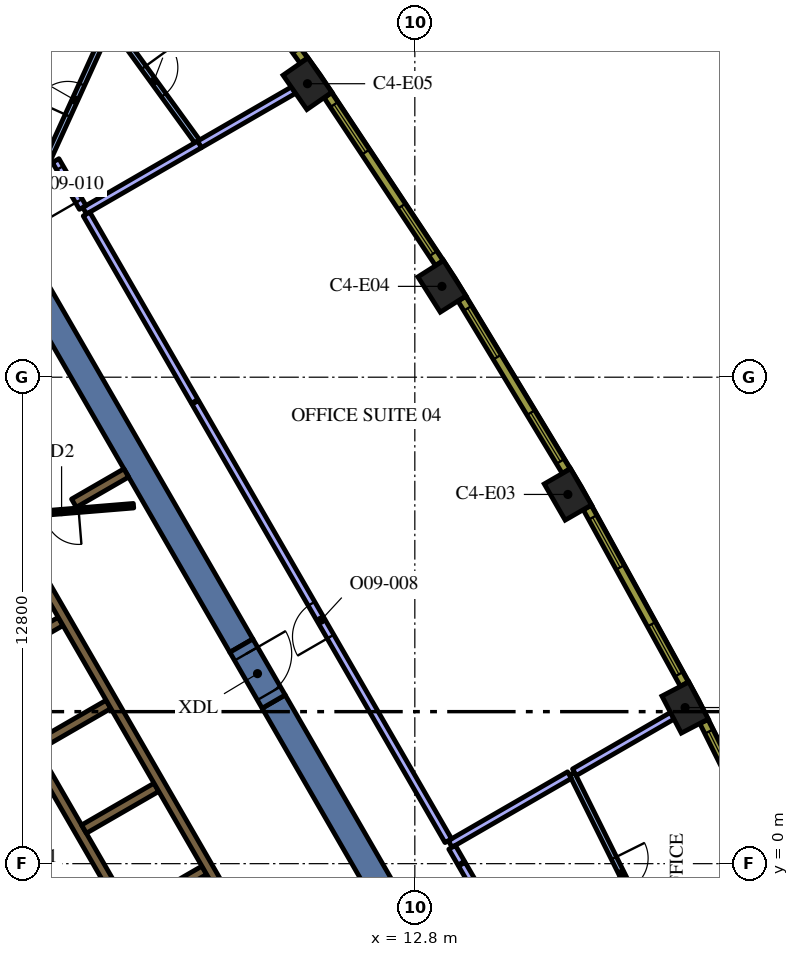
"""IFC4 building model, lengths in metres.
Left out: names, types, materials, properties, quantities, classifications, styles, units other than length and angle.
Written with IfcOpenShell. Run it as: python <this file> out.ifc"""

import sys

from ifc_helpers import new_model, si_unit, direction, frame, frame_2d, origin, origin_2d, place, context, subcontext, project, spatial, rectangle, extrude, element, fill, save


model = new_model("IFC4")
c1 = context("Model", 3, precision=1e-05, world=origin(), true_north=direction((0.0, 1.0)))
c2 = subcontext(c1, "Body", "Model", "MODEL_VIEW")
j1 = project(units=[si_unit("LENGTHUNIT", "METRE"), si_unit("PLANEANGLEUNIT", "RADIAN")], contexts=[c1])
p1 = place(None, origin())
s1 = spatial("IfcSite", under=j1, at=p1, CompositionType="ELEMENT")
p2 = place(p1, origin())
s2 = spatial("IfcBuilding", under=s1, at=p2, CompositionType="ELEMENT")
p3 = place(p2, frame((0.0, 0.0, 247.8)))
s3 = spatial("IfcBuildingStorey", under=s2, at=p3, CompositionType="ELEMENT", Elevation=247.8)
for number, where, z_axis, x_axis in (
    (1, (19.912, 4.108, 0.0), (0.0, 0.0, 1.0), (-0.464, 0.886, 0.0)),
    (2, (16.827, 9.715, 0.0), (0.0, 0.0, 1.0), (-0.5, 0.866, 0.0)),
    (3, (13.513, 15.19, 0.0), (0.0, 0.0, 1.0), (-0.536, 0.845, 0.0)),
    (4, (9.975, 20.522, 0.0), (0.0, 0.0, 1.0), (-0.57, 0.822, 0.0)),
):
    element("IfcColumn", number, at=place(p3, frame(where, z_axis=z_axis, x_axis=x_axis)), inside=s3, PredefinedType="COLUMN", context=c2, shape_type="SweptSolid", body=[
        extrude(rectangle(XDim=1.1, YDim=0.8, at=origin_2d()), origin(), (0.0, 0.0, 1.0), 4.2),
    ])
for number, where, z_axis, x_axis in (
    (5, (9.085, 4.264, 0.0), (0.0, 0.0, 1.0), (0.5, -0.866, 0.0)),
    (6, (8.235, 5.736, 0.0), (0.0, 0.0, 1.0), (-0.5, 0.866, 0.0)),
):
    element("IfcWall", number, at=place(p3, frame(where, z_axis=z_axis, x_axis=x_axis)), inside=s3, PredefinedType="SOLIDWALL", context=c2, shape_type="SweptSolid", body=[
        extrude(rectangle(XDim=12.472, YDim=0.7, at=frame_2d((6.236, 0.0))), origin(), (0.0, 0.0, 1.0), 4.2),
    ])
p4 = place(p3, frame((6.568, -3.627, 0.0), z_axis=(0.0, 0.0, 1.0), x_axis=(-0.499999455981, 0.866025717874, 0.0)))
e7 = element("IfcWall", 7, at=p4, inside=s3, PredefinedType="SOLIDWALL", context=c2, shape_type="SweptSolid", body=[
    extrude(rectangle(XDim=11.978, YDim=0.25, at=frame_2d((5.989, 0.0))), origin(), (0.0, 0.0, 1.0), 4.2),
])
p5 = place(p3, frame((1.574, 5.274, 0.0), z_axis=(0.0, 0.0, 1.0), x_axis=(0.866028486751, 0.499994660107, 0.0)))
e8 = element("IfcWall", 8, at=p5, inside=s3, PredefinedType="SOLIDWALL", context=c2, shape_type="SweptSolid", body=[
    extrude(rectangle(XDim=2.2, YDim=0.25, at=frame_2d((1.1, 0.0))), origin(), (0.0, 0.0, 1.0), 4.2),
])
for number, where, z_axis, x_axis in (
    (9, (2.834, 3.091, 0.0), (0.0, 0.0, 1.0), (0.866, 0.5, 0.0)),
    (10, (4.094, 0.909, 0.0), (0.0, 0.0, 1.0), (0.866, 0.5, 0.0)),
    (11, (5.354, -1.274, 0.0), (0.0, 0.0, 1.0), (0.866, 0.5, 0.0)),
):
    element("IfcWall", number, at=place(p3, frame(where, z_axis=z_axis, x_axis=x_axis)), inside=s3, PredefinedType="SOLIDWALL", context=c2, shape_type="SweptSolid", body=[
        extrude(rectangle(XDim=2.2, YDim=0.25, at=frame_2d((1.1, 0.0))), origin(), (0.0, 0.0, 1.0), 4.2),
    ])
p6 = place(p3, frame((3.83, 9.486, 0.0), z_axis=(0.0, 0.0, 1.0), x_axis=(0.865986202621, 0.500067892261, 0.0)))
e12 = element("IfcWall", 12, at=p6, inside=s3, PredefinedType="SOLIDWALL", context=c2, shape_type="SweptSolid", body=[
    extrude(rectangle(XDim=1.591, YDim=0.25, at=frame_2d((0.795, 0.0))), origin(), (0.0, 0.0, 1.0), 4.2),
])
p7 = place(p3, frame((8.565, -2.185, 0.0), z_axis=(0.0, 0.0, 1.0), x_axis=(-0.499997954832, 0.866026584559, 0.0)))
e13 = element("IfcWall", 13, at=p7, inside=s3, PredefinedType="SOLIDWALL", context=c2, shape_type="SweptSolid", body=[
    extrude(rectangle(XDim=12.35, YDim=0.25, at=frame_2d((6.175, 0.0))), origin(), (0.0, 0.0, 1.0), 4.2),
])
p8 = place(p7, frame((0.585, 0.0, 0.0)))
e14 = element("IfcOpeningElement", 14, at=p8, cuts=e13, PredefinedType="OPENING", context=c2, shape_type="SweptSolid", body=[
    extrude(rectangle(XDim=1.1, YDim=2.1, at=frame_2d((0.55, 1.05))), frame((0.0, 0.135, 0.0), z_axis=(0.0, -1.0, 0.0), x_axis=(1.0, 0.0, 0.0)), (0.0, 0.0, 1.0), 0.27),
])
p9 = place(p3, frame((5.398, 9.419, 0.0), z_axis=(0.0, 0.0, 1.0), x_axis=(-0.996653416376, -0.081743303248, 0.0)))
e15 = element("IfcWall", 15, at=p9, inside=s3, PredefinedType="PARTITIONING", context=c2, shape_type="SweptSolid", body=[
    extrude(rectangle(XDim=2.7, YDim=0.12, at=frame_2d((1.35, 0.0))), origin(), (0.0, 0.0, 1.0), 3.45),
])
p10 = place(p9, frame((1.45, 0.0, 0.0)))
e16 = element("IfcOpeningElement", 16, at=p10, cuts=e15, PredefinedType="OPENING", context=c2, shape_type="SweptSolid", body=[
    extrude(rectangle(XDim=0.9, YDim=2.1, at=frame_2d((0.45, 1.05))), frame((0.0, 0.07, 0.0), z_axis=(0.0, -1.0, 0.0), x_axis=(1.0, 0.0, 0.0)), (0.0, 0.0, 1.0), 0.14),
])
p11 = place(p3, frame((8.235, 5.736, 0.0), z_axis=(0.0, 0.0, 1.0), x_axis=(0.499954529098, -0.86605165483, 0.0)))
e17 = element("IfcWall", 17, at=p11, inside=s3, PredefinedType="SOLIDWALL", context=c2, shape_type="SweptSolid", body=[
    extrude(rectangle(XDim=1.7, YDim=0.7, at=frame_2d((0.85, 0.0))), origin(), (0.0, 0.0, 1.0), 4.2),
])
p12 = place(p11, frame((0.25, 0.0, 0.0)))
e18 = element("IfcOpeningElement", 18, at=p12, cuts=e17, PredefinedType="OPENING", context=c2, shape_type="SweptSolid", body=[
    extrude(rectangle(XDim=1.2, YDim=2.1, at=frame_2d((0.6, 1.05))), frame((0.0, 0.36, 0.0), z_axis=(0.0, -1.0, 0.0), x_axis=(1.0, 0.0, 0.0)), (0.0, 0.0, 1.0), 0.72),
])
p13 = place(p3, frame((16.935, 2.368, 0.0), z_axis=(0.0, 0.0, 1.0), x_axis=(0.445153322039, -0.895454365045, 0.0)))
e19 = element("IfcWall", 19, at=p13, inside=s3, PredefinedType="PARTITIONING", context=c2, shape_type="SweptSolid", body=[
    extrude(rectangle(XDim=5.881, YDim=0.15, at=frame_2d((2.94, 0.0))), origin(), (0.0, 0.0, 1.0), 3.45),
])
p14 = place(p13, frame((2.481, 0.0, 0.0)))
e20 = element("IfcOpeningElement", 20, at=p14, cuts=e19, PredefinedType="OPENING", context=c2, shape_type="SweptSolid", body=[
    extrude(rectangle(XDim=0.9, YDim=2.1, at=frame_2d((0.45, 1.05))), frame((0.0, 0.085, 0.0), z_axis=(0.0, -1.0, 0.0), x_axis=(1.0, 0.0, 0.0)), (0.0, 0.0, 1.0), 0.17),
])
p15 = place(p3, frame((17.0, 2.406, 0.0), z_axis=(0.0, 0.0, 1.0), x_axis=(0.86605561342, 0.499947671726, 0.0)))
e21 = element("IfcWall", 21, at=p15, inside=s3, PredefinedType="PARTITIONING", context=c2, shape_type="SweptSolid", body=[
    extrude(rectangle(XDim=2.971, YDim=0.2, at=frame_2d((1.486, 0.0))), origin(), (0.0, 0.0, 1.0), 3.45),
])
p16 = place(p3, frame((13.731, 0.518, 0.0), z_axis=(0.0, 0.0, 1.0), x_axis=(0.8660128559, 0.500021732944, 0.0)))
e22 = element("IfcWall", 22, at=p16, inside=s3, PredefinedType="PARTITIONING", context=c2, shape_type="SweptSolid", body=[
    extrude(rectangle(XDim=3.625, YDim=0.2, at=frame_2d((1.812, 0.0))), origin(), (0.0, 0.0, 1.0), 3.45),
])
p17 = place(p3, frame((14.022, 0.013, 0.0), z_axis=(0.0, 0.0, 1.0), x_axis=(-0.500159754115, 0.865933150054, 0.0)))
e23 = element("IfcWall", 23, at=p17, inside=s3, PredefinedType="PARTITIONING", context=c2, shape_type="SweptSolid", body=[
    extrude(rectangle(XDim=0.483, YDim=0.2, at=frame_2d((0.242, 0.0))), origin(), (0.0, 0.0, 1.0), 3.45),
])
p18 = place(p3, frame((17.681, -6.324, 0.0), z_axis=(0.0, 0.0, 1.0), x_axis=(-0.50002695829, 0.866009838849, 0.0)))
e24 = element("IfcWall", 24, at=p18, inside=s3, PredefinedType="PARTITIONING", context=c2, shape_type="SweptSolid", body=[
    extrude(rectangle(XDim=7.287, YDim=0.2, at=frame_2d((3.644, 0.0))), origin(), (0.0, 0.0, 1.0), 3.45),
])
p19 = place(p18, frame((3.1, 0.0, 0.0)))
e25 = element("IfcOpeningElement", 25, at=p19, cuts=e24, PredefinedType="OPENING", context=c2, shape_type="SweptSolid", body=[
    extrude(rectangle(XDim=1.0, YDim=2.1, at=frame_2d((0.5, 1.05))), frame((0.0, 0.11, 0.0), z_axis=(0.0, -1.0, 0.0), x_axis=(1.0, 0.0, 0.0)), (0.0, 0.0, 1.0), 0.22),
])
p20 = place(p3, frame((7.128, 18.922, 0.0), z_axis=(0.0, 0.0, 1.0), x_axis=(0.866023575777, 0.500003166188, 0.0)))
e26 = element("IfcWall", 26, at=p20, inside=s3, PredefinedType="PARTITIONING", context=c2, shape_type="SweptSolid", body=[
    extrude(rectangle(XDim=2.861, YDim=0.2, at=frame_2d((1.43, 0.0))), origin(), (0.0, 0.0, 1.0), 3.45),
])
p21 = place(p3, frame((4.111, 17.18, 0.0), z_axis=(0.0, 0.0, 1.0), x_axis=(0.866031916153, 0.499988720078, 0.0)))
e27 = element("IfcWall", 27, at=p21, inside=s3, PredefinedType="PARTITIONING", context=c2, shape_type="SweptSolid", body=[
    extrude(rectangle(XDim=3.492, YDim=0.2, at=frame_2d((1.746, 0.0))), origin(), (0.0, 0.0, 1.0), 3.45),
])
p22 = place(p3, frame((13.681, 0.604, 0.0), z_axis=(0.0, 0.0, 1.0), x_axis=(-0.500001759768, 0.86602438778, 0.0)))
e28 = element("IfcWall", 28, at=p22, inside=s3, PredefinedType="PARTITIONING", context=c2, shape_type="SweptSolid", body=[
    extrude(rectangle(XDim=13.317, YDim=0.2, at=frame_2d((6.658, 0.0))), origin(), (0.0, 0.0, 1.0), 3.45),
])
p23 = place(p22, frame((6.2, 0.0, 0.0)))
e29 = element("IfcOpeningElement", 29, at=p23, cuts=e28, PredefinedType="OPENING", context=c2, shape_type="SweptSolid", body=[
    extrude(rectangle(XDim=1.0, YDim=2.1, at=frame_2d((0.5, 1.05))), frame((0.0, 0.11, 0.0), z_axis=(0.0, -1.0, 0.0), x_axis=(1.0, 0.0, 0.0)), (0.0, 0.0, 1.0), 0.22),
])
p24 = place(p3, frame((7.007, 12.163, 0.0), z_axis=(0.0, 0.0, 1.0), x_axis=(-0.499986040413, 0.866033463206, 0.0)))
e30 = element("IfcWall", 30, at=p24, inside=s3, PredefinedType="PARTITIONING", context=c2, shape_type="SweptSolid", body=[
    extrude(rectangle(XDim=5.693, YDim=0.2, at=frame_2d((2.846, 0.0))), origin(), (0.0, 0.0, 1.0), 3.45),
])
p25 = place(p3, frame((4.791, 22.152, 0.0), z_axis=(0.0, 0.0, 1.0), x_axis=(0.586987127968, -0.809596264567, 0.0)))
e31 = element("IfcWall", 31, at=p25, inside=s3, PredefinedType="PARTITIONING", context=c2, shape_type="SweptSolid", body=[
    extrude(rectangle(XDim=3.887, YDim=0.15, at=frame_2d((1.943, 0.0))), origin(), (0.0, 0.0, 1.0), 3.45),
])
p26 = place(p25, frame((1.487, 0.0, 0.0)))
e32 = element("IfcOpeningElement", 32, at=p26, cuts=e31, PredefinedType="OPENING", context=c2, shape_type="SweptSolid", body=[
    extrude(rectangle(XDim=0.9, YDim=2.1, at=frame_2d((0.45, 1.05))), frame((0.0, 0.085, 0.0), z_axis=(0.0, -1.0, 0.0), x_axis=(1.0, 0.0, 0.0)), (0.0, 0.0, 1.0), 0.17),
])
p27 = place(p3, frame((3.129, 18.5, 0.0), z_axis=(0.0, 0.0, 1.0), x_axis=(0.414332290546, 0.910125679789, 0.0)))
e33 = element("IfcWall", 33, at=p27, inside=s3, PredefinedType="PARTITIONING", context=c2, shape_type="SweptSolid", body=[
    extrude(rectangle(XDim=3.926, YDim=0.15, at=frame_2d((1.963, 0.0))), origin(), (0.0, 0.0, 1.0), 3.45),
])
p28 = place(p27, frame((1.3, 0.0, 0.0)))
e34 = element("IfcOpeningElement", 34, at=p28, cuts=e33, PredefinedType="OPENING", context=c2, shape_type="SweptSolid", body=[
    extrude(rectangle(XDim=0.9, YDim=2.1, at=frame_2d((0.45, 1.05))), frame((0.0, 0.085, 0.0), z_axis=(0.0, -1.0, 0.0), x_axis=(1.0, 0.0, 0.0)), (0.0, 0.0, 1.0), 0.17),
])
p29 = place(p3, frame((4.061, 17.266, 0.0), z_axis=(0.0, 0.0, 1.0), x_axis=(-0.49995489152, 0.866051445611, 0.0)))
e35 = element("IfcWall", 35, at=p29, inside=s3, PredefinedType="PARTITIONING", context=c2, shape_type="SweptSolid", body=[
    extrude(rectangle(XDim=1.425, YDim=0.2, at=frame_2d((0.712, 0.0))), origin(), (0.0, 0.0, 1.0), 3.45),
])
p30 = place(p29, frame((0.2, 0.0, 0.0)))
e36 = element("IfcOpeningElement", 36, at=p30, cuts=e35, PredefinedType="OPENING", context=c2, shape_type="SweptSolid", body=[
    extrude(rectangle(XDim=1.0, YDim=2.1, at=frame_2d((0.5, 1.05))), frame((0.0, 0.11, 0.0), z_axis=(0.0, -1.0, 0.0), x_axis=(1.0, 0.0, 0.0)), (0.0, 0.0, 1.0), 0.22),
])
p31 = place(p3, frame((22.766, -1.005, 0.0), z_axis=(0.0, 0.0, 1.0), x_axis=(-0.445129582031, 0.895466166419, 0.0)))
e37 = element("IfcWall", 37, at=p31, inside=s3, PredefinedType="SOLIDWALL", context=c2, shape_type="SweptSolid", body=[
    extrude(rectangle(XDim=5.298, YDim=0.24, at=frame_2d((2.649, 0.0))), origin(), (0.0, 0.0, 1.0), 3.95),
])
p32 = place(p31, frame((0.295, 0.0, 0.9)))
e38 = element("IfcOpeningElement", 38, at=p32, cuts=e37, PredefinedType="OPENING", context=c2, shape_type="SweptSolid", body=[
    extrude(rectangle(XDim=1.5, YDim=2.55, at=frame_2d((0.75, 1.275))), frame((0.0, 0.13, 0.0), z_axis=(0.0, -1.0, 0.0), x_axis=(1.0, 0.0, 0.0)), (0.0, 0.0, 1.0), 0.26),
])
p33 = place(p31, frame((3.504, 0.0, 0.9)))
e39 = element("IfcOpeningElement", 39, at=p33, cuts=e37, PredefinedType="OPENING", context=c2, shape_type="SweptSolid", body=[
    extrude(rectangle(XDim=1.5, YDim=2.55, at=frame_2d((0.75, 1.275))), frame((0.0, 0.13, 0.0), z_axis=(0.0, -1.0, 0.0), x_axis=(1.0, 0.0, 0.0)), (0.0, 0.0, 1.0), 0.26),
])
p34 = place(p3, frame((19.892, 4.725, 0.0), z_axis=(0.0, 0.0, 1.0), x_axis=(-0.481925825015, 0.876212017256, 0.0)))
e40 = element("IfcWall", 40, at=p34, inside=s3, PredefinedType="SOLIDWALL", context=c2, shape_type="SweptSolid", body=[
    extrude(rectangle(XDim=5.299, YDim=0.24, at=frame_2d((2.649, 0.0))), origin(), (0.0, 0.0, 1.0), 3.95),
])
p35 = place(p34, frame((0.295, 0.0, 0.9)))
e41 = element("IfcOpeningElement", 41, at=p35, cuts=e40, PredefinedType="OPENING", context=c2, shape_type="SweptSolid", body=[
    extrude(rectangle(XDim=1.5, YDim=2.55, at=frame_2d((0.75, 1.275))), frame((0.0, 0.13, 0.0), z_axis=(0.0, -1.0, 0.0), x_axis=(1.0, 0.0, 0.0)), (0.0, 0.0, 1.0), 0.26),
])
p36 = place(p34, frame((3.504, 0.0, 0.9)))
e42 = element("IfcOpeningElement", 42, at=p36, cuts=e40, PredefinedType="OPENING", context=c2, shape_type="SweptSolid", body=[
    extrude(rectangle(XDim=1.5, YDim=2.55, at=frame_2d((0.75, 1.275))), frame((0.0, 0.13, 0.0), z_axis=(0.0, -1.0, 0.0), x_axis=(1.0, 0.0, 0.0)), (0.0, 0.0, 1.0), 0.26),
])
p37 = place(p3, frame((16.782, 10.331, 0.0), z_axis=(0.0, 0.0, 1.0), x_axis=(-0.517846166225, 0.855473756538, 0.0)))
e43 = element("IfcWall", 43, at=p37, inside=s3, PredefinedType="SOLIDWALL", context=c2, shape_type="SweptSolid", body=[
    extrude(rectangle(XDim=5.298, YDim=0.24, at=frame_2d((2.649, 0.0))), origin(), (0.0, 0.0, 1.0), 3.95),
])
p38 = place(p37, frame((0.294, 0.0, 0.9)))
e44 = element("IfcOpeningElement", 44, at=p38, cuts=e43, PredefinedType="OPENING", context=c2, shape_type="SweptSolid", body=[
    extrude(rectangle(XDim=1.5, YDim=2.55, at=frame_2d((0.75, 1.275))), frame((0.0, 0.13, 0.0), z_axis=(0.0, -1.0, 0.0), x_axis=(1.0, 0.0, 0.0)), (0.0, 0.0, 1.0), 0.26),
])
p39 = place(p37, frame((3.504, 0.0, 0.9)))
e45 = element("IfcOpeningElement", 45, at=p39, cuts=e43, PredefinedType="OPENING", context=c2, shape_type="SweptSolid", body=[
    extrude(rectangle(XDim=1.5, YDim=2.55, at=frame_2d((0.75, 1.275))), frame((0.0, 0.13, 0.0), z_axis=(0.0, -1.0, 0.0), x_axis=(1.0, 0.0, 0.0)), (0.0, 0.0, 1.0), 0.26),
])
p40 = place(p3, frame((13.442, 15.803, 0.0), z_axis=(0.0, 0.0, 1.0), x_axis=(-0.552901821755, 0.833246407433, 0.0)))
e46 = element("IfcWall", 46, at=p40, inside=s3, PredefinedType="SOLIDWALL", context=c2, shape_type="SweptSolid", body=[
    extrude(rectangle(XDim=5.298, YDim=0.24, at=frame_2d((2.649, 0.0))), origin(), (0.0, 0.0, 1.0), 3.95),
])
p41 = place(p40, frame((0.295, 0.0, 0.9)))
e47 = element("IfcOpeningElement", 47, at=p41, cuts=e46, PredefinedType="OPENING", context=c2, shape_type="SweptSolid", body=[
    extrude(rectangle(XDim=1.5, YDim=2.55, at=frame_2d((0.75, 1.275))), frame((0.0, 0.13, 0.0), z_axis=(0.0, -1.0, 0.0), x_axis=(1.0, 0.0, 0.0)), (0.0, 0.0, 1.0), 0.26),
])
p42 = place(p40, frame((3.504, 0.0, 0.9)))
e48 = element("IfcOpeningElement", 48, at=p42, cuts=e46, PredefinedType="OPENING", context=c2, shape_type="SweptSolid", body=[
    extrude(rectangle(XDim=1.5, YDim=2.55, at=frame_2d((0.75, 1.275))), frame((0.0, 0.13, 0.0), z_axis=(0.0, -1.0, 0.0), x_axis=(1.0, 0.0, 0.0)), (0.0, 0.0, 1.0), 0.26),
])
p43 = place(p3, frame((9.878, 21.132, 0.0), z_axis=(0.0, 0.0, 1.0), x_axis=(-0.586998456641, 0.80958805074, 0.0)))
e49 = element("IfcWall", 49, at=p43, inside=s3, PredefinedType="SOLIDWALL", context=c2, shape_type="SweptSolid", body=[
    extrude(rectangle(XDim=5.311, YDim=0.24, at=frame_2d((2.655, 0.0))), origin(), (0.0, 0.0, 1.0), 3.95),
])
p44 = place(p43, frame((0.306, 0.0, 0.9)))
e50 = element("IfcOpeningElement", 50, at=p44, cuts=e49, PredefinedType="OPENING", context=c2, shape_type="SweptSolid", body=[
    extrude(rectangle(XDim=1.5, YDim=2.55, at=frame_2d((0.75, 1.275))), frame((0.0, 0.13, 0.0), z_axis=(0.0, -1.0, 0.0), x_axis=(1.0, 0.0, 0.0)), (0.0, 0.0, 1.0), 0.26),
])
p45 = place(p43, frame((3.539, 0.0, 0.9)))
e51 = element("IfcOpeningElement", 51, at=p45, cuts=e49, PredefinedType="OPENING", context=c2, shape_type="SweptSolid", body=[
    extrude(rectangle(XDim=1.5, YDim=2.55, at=frame_2d((0.75, 1.275))), frame((0.0, 0.13, 0.0), z_axis=(0.0, -1.0, 0.0), x_axis=(1.0, 0.0, 0.0)), (0.0, 0.0, 1.0), 0.26),
])
p46 = place(p10, origin())
e52 = element("IfcDoor", 52, at=p46, inside=s3, OperationType="SINGLE_SWING_LEFT", PredefinedType="DOOR", context=c2, shape_type="SweptSolid", body=[
    extrude(rectangle(XDim=0.9, YDim=2.1, at=frame_2d((0.45, 1.05))), frame((0.0, 0.025, 0.0), z_axis=(0.0, -1.0, 0.0), x_axis=(1.0, 0.0, 0.0)), (0.0, 0.0, 1.0), 0.05),
])
fill(e16, e52)
p47 = place(p12, origin())
e53 = element("IfcDoor", 53, at=p47, inside=s3, OperationType="SINGLE_SWING_LEFT", PredefinedType="DOOR", context=c2, shape_type="SweptSolid", body=[
    extrude(rectangle(XDim=1.2, YDim=2.1, at=frame_2d((0.6, 1.05))), frame((0.0, 0.025, 0.0), z_axis=(0.0, -1.0, 0.0), x_axis=(1.0, 0.0, 0.0)), (0.0, 0.0, 1.0), 0.05),
])
fill(e18, e53)
p48 = place(p14, origin())
e54 = element("IfcDoor", 54, at=p48, inside=s3, OperationType="SINGLE_SWING_LEFT", PredefinedType="DOOR", context=c2, shape_type="SweptSolid", body=[
    extrude(rectangle(XDim=0.9, YDim=2.1, at=frame_2d((0.45, 1.05))), frame((0.0, 0.025, 0.0), z_axis=(0.0, -1.0, 0.0), x_axis=(1.0, 0.0, 0.0)), (0.0, 0.0, 1.0), 0.05),
])
fill(e20, e54)
p49 = place(p23, origin())
e55 = element("IfcDoor", 55, at=p49, inside=s3, OperationType="SINGLE_SWING_RIGHT", PredefinedType="DOOR", context=c2, shape_type="SweptSolid", body=[
    extrude(rectangle(XDim=1.0, YDim=2.1, at=frame_2d((0.5, 1.05))), frame((0.0, 0.025, 0.0), z_axis=(0.0, -1.0, 0.0), x_axis=(1.0, 0.0, 0.0)), (0.0, 0.0, 1.0), 0.05),
])
fill(e29, e55)
p50 = place(p26, origin())
e56 = element("IfcDoor", 56, at=p50, inside=s3, OperationType="SINGLE_SWING_LEFT", PredefinedType="DOOR", context=c2, shape_type="SweptSolid", body=[
    extrude(rectangle(XDim=0.9, YDim=2.1, at=frame_2d((0.45, 1.05))), frame((0.0, 0.025, 0.0), z_axis=(0.0, -1.0, 0.0), x_axis=(1.0, 0.0, 0.0)), (0.0, 0.0, 1.0), 0.05),
])
fill(e32, e56)
p51 = place(p30, origin())
e57 = element("IfcDoor", 57, at=p51, inside=s3, OperationType="SINGLE_SWING_LEFT", PredefinedType="DOOR", context=c2, shape_type="SweptSolid", body=[
    extrude(rectangle(XDim=1.0, YDim=2.1, at=frame_2d((0.5, 1.05))), frame((0.0, 0.025, 0.0), z_axis=(0.0, -1.0, 0.0), x_axis=(1.0, 0.0, 0.0)), (0.0, 0.0, 1.0), 0.05),
])
fill(e36, e57)
p52 = place(p28, origin())
e58 = element("IfcDoor", 58, at=p52, inside=s3, OperationType="SINGLE_SWING_LEFT", PredefinedType="DOOR", context=c2, shape_type="SweptSolid", body=[
    extrude(rectangle(XDim=0.9, YDim=2.1, at=frame_2d((0.45, 1.05))), frame((0.0, 0.025, 0.0), z_axis=(0.0, -1.0, 0.0), x_axis=(1.0, 0.0, 0.0)), (0.0, 0.0, 1.0), 0.05),
])
fill(e34, e58)
p53 = place(p33, origin())
e59 = element("IfcWindow", 59, at=p53, inside=s3, PartitioningType="SINGLE_PANEL", PredefinedType="WINDOW", context=c2, shape_type="SweptSolid", body=[
    extrude(rectangle(XDim=1.5, YDim=2.55, at=frame_2d((0.75, 1.275))), frame((0.0, 0.04, 0.0), z_axis=(0.0, -1.0, 0.0), x_axis=(1.0, 0.0, 0.0)), (0.0, 0.0, 1.0), 0.06),
])
fill(e39, e59)
p54 = place(p35, origin())
e60 = element("IfcWindow", 60, at=p54, inside=s3, PartitioningType="SINGLE_PANEL", PredefinedType="WINDOW", context=c2, shape_type="SweptSolid", body=[
    extrude(rectangle(XDim=1.5, YDim=2.55, at=frame_2d((0.75, 1.275))), frame((0.0, 0.04, 0.0), z_axis=(0.0, -1.0, 0.0), x_axis=(1.0, 0.0, 0.0)), (0.0, 0.0, 1.0), 0.06),
])
fill(e41, e60)
p55 = place(p36, origin())
e61 = element("IfcWindow", 61, at=p55, inside=s3, PartitioningType="SINGLE_PANEL", PredefinedType="WINDOW", context=c2, shape_type="SweptSolid", body=[
    extrude(rectangle(XDim=1.5, YDim=2.55, at=frame_2d((0.75, 1.275))), frame((0.0, 0.04, 0.0), z_axis=(0.0, -1.0, 0.0), x_axis=(1.0, 0.0, 0.0)), (0.0, 0.0, 1.0), 0.06),
])
fill(e42, e61)
p56 = place(p38, origin())
e62 = element("IfcWindow", 62, at=p56, inside=s3, PartitioningType="SINGLE_PANEL", PredefinedType="WINDOW", context=c2, shape_type="SweptSolid", body=[
    extrude(rectangle(XDim=1.5, YDim=2.55, at=frame_2d((0.75, 1.275))), frame((0.0, 0.04, 0.0), z_axis=(0.0, -1.0, 0.0), x_axis=(1.0, 0.0, 0.0)), (0.0, 0.0, 1.0), 0.06),
])
fill(e44, e62)
p57 = place(p39, origin())
e63 = element("IfcWindow", 63, at=p57, inside=s3, PartitioningType="SINGLE_PANEL", PredefinedType="WINDOW", context=c2, shape_type="SweptSolid", body=[
    extrude(rectangle(XDim=1.5, YDim=2.55, at=frame_2d((0.75, 1.275))), frame((0.0, 0.04, 0.0), z_axis=(0.0, -1.0, 0.0), x_axis=(1.0, 0.0, 0.0)), (0.0, 0.0, 1.0), 0.06),
])
fill(e45, e63)
p58 = place(p41, origin())
e64 = element("IfcWindow", 64, at=p58, inside=s3, PartitioningType="SINGLE_PANEL", PredefinedType="WINDOW", context=c2, shape_type="SweptSolid", body=[
    extrude(rectangle(XDim=1.5, YDim=2.55, at=frame_2d((0.75, 1.275))), frame((0.0, 0.04, 0.0), z_axis=(0.0, -1.0, 0.0), x_axis=(1.0, 0.0, 0.0)), (0.0, 0.0, 1.0), 0.06),
])
fill(e47, e64)
p59 = place(p42, origin())
e65 = element("IfcWindow", 65, at=p59, inside=s3, PartitioningType="SINGLE_PANEL", PredefinedType="WINDOW", context=c2, shape_type="SweptSolid", body=[
    extrude(rectangle(XDim=1.5, YDim=2.55, at=frame_2d((0.75, 1.275))), frame((0.0, 0.04, 0.0), z_axis=(0.0, -1.0, 0.0), x_axis=(1.0, 0.0, 0.0)), (0.0, 0.0, 1.0), 0.06),
])
fill(e48, e65)
save(model, sys.argv[1])
